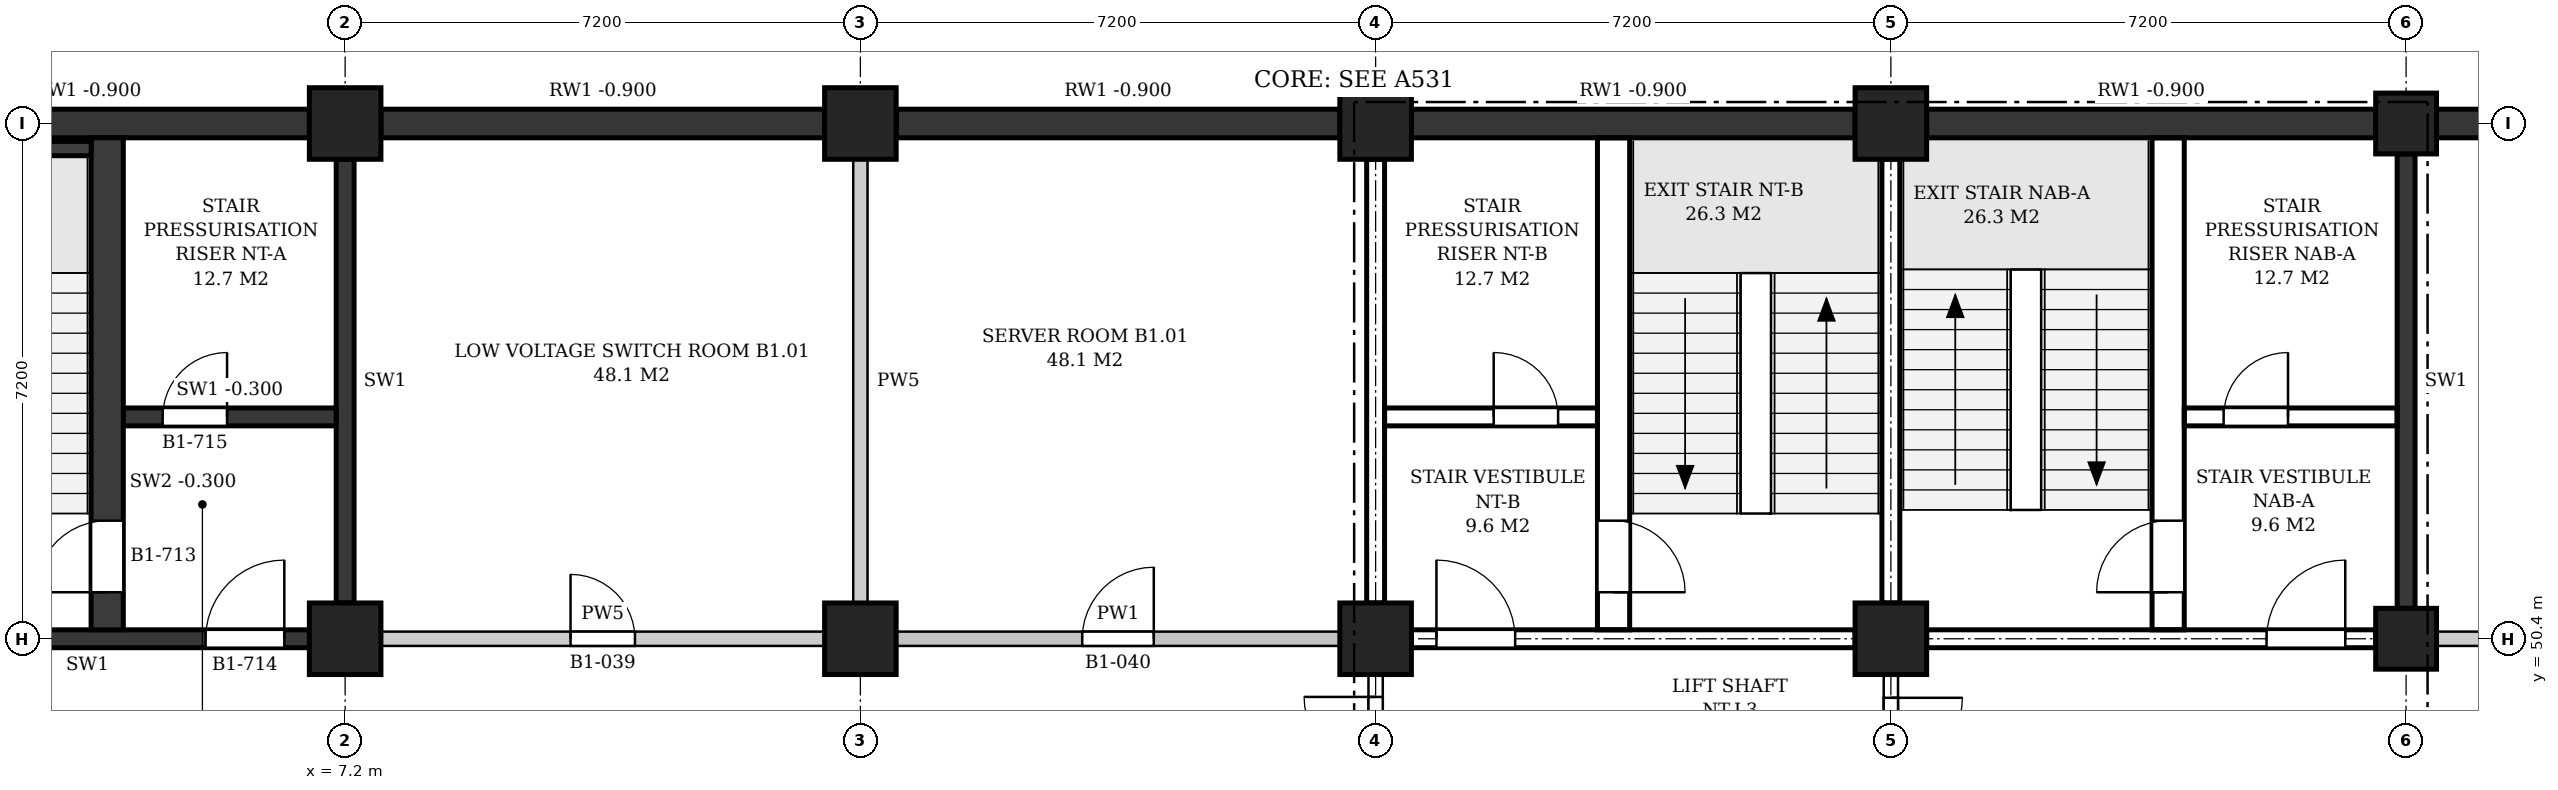
"""IFC4 building model, lengths in metres.
Left out: names, types, materials, properties, quantities, classifications, styles, units other than length and angle.
Written with IfcOpenShell. Run it as: python <this file> out.ifc"""

import sys

from ifc_helpers import new_model, si_unit, direction, frame, frame_2d, origin, origin_2d, place, context, subcontext, project, spatial, rectangle, extrude, element, fill, save


model = new_model("IFC4")
c1 = context("Model", 3, precision=1e-05, world=origin(), true_north=direction((0.0, 1.0)))
c2 = subcontext(c1, "Body", "Model", "MODEL_VIEW")
j1 = project(units=[si_unit("LENGTHUNIT", "METRE"), si_unit("PLANEANGLEUNIT", "RADIAN")], contexts=[c1])
p1 = place(None, origin())
s1 = spatial("IfcSite", under=j1, at=p1, CompositionType="ELEMENT")
p2 = place(p1, origin())
s2 = spatial("IfcBuilding", under=s1, at=p2, CompositionType="ELEMENT")
p3 = place(p2, frame((0.0, 0.0, -4.5)))
s3 = spatial("IfcBuildingStorey", under=s2, at=p3, CompositionType="ELEMENT", Elevation=-4.5)
for number, where, z_axis, x_axis in (
    (1, (7.2, 50.4, 0.0), (0.0, 0.0, 1.0), (1.0, 0.0, 0.0)),
    (2, (7.2, 57.6, 0.0), (0.0, 0.0, 1.0), (1.0, 0.0, 0.0)),
    (3, (14.4, 50.4, 0.0), (0.0, 0.0, 1.0), (1.0, 0.0, 0.0)),
    (4, (14.4, 57.6, 0.0), (0.0, 0.0, 1.0), (1.0, 0.0, 0.0)),
    (5, (21.6, 50.4, 0.0), (0.0, 0.0, 1.0), (1.0, 0.0, 0.0)),
    (6, (21.6, 57.6, 0.0), (0.0, 0.0, 1.0), (1.0, 0.0, 0.0)),
    (7, (28.8, 50.4, 0.0), (0.0, 0.0, 1.0), (1.0, 0.0, 0.0)),
    (8, (28.8, 57.6, 0.0), (0.0, 0.0, 1.0), (1.0, 0.0, 0.0)),
):
    element("IfcColumn", number, at=place(p3, frame(where, z_axis=z_axis, x_axis=x_axis)), inside=s3, PredefinedType="COLUMN", context=c2, shape_type="SweptSolid", body=[
        extrude(rectangle(XDim=1.0, YDim=1.0, at=origin_2d()), origin(), (0.0, 0.0, 1.0), 4.5),
    ])
for number, where, z_axis, x_axis in (
    (9, (36.0, 50.4, 0.0), (0.0, 0.0, 1.0), (1.0, 0.0, 0.0)),
    (10, (36.0, 57.6, 0.0), (0.0, 0.0, 1.0), (1.0, 0.0, 0.0)),
):
    element("IfcColumn", number, at=place(p3, frame(where, z_axis=z_axis, x_axis=x_axis)), inside=s3, PredefinedType="COLUMN", context=c2, shape_type="SweptSolid", body=[
        extrude(rectangle(XDim=0.85, YDim=0.85, at=origin_2d()), origin(), (0.0, 0.0, 1.0), 4.5),
    ])
p4 = place(p3, frame((42.775, 57.6, 0.0), z_axis=(0.0, 0.0, 1.0), x_axis=(-1.0, 0.0, 0.0)))
e11 = element("IfcWall", 11, at=p4, inside=s3, PredefinedType="SOLIDWALL", context=c2, shape_type="SweptSolid", body=[
    extrude(rectangle(XDim=6.35, YDim=0.4, at=frame_2d((3.175, 0.0))), origin(), (0.0, 0.0, 1.0), 3.6),
])
p5 = place(p3, frame((35.575, 57.6, 0.0), z_axis=(0.0, 0.0, 1.0), x_axis=(-1.0, 0.0, 0.0)))
e12 = element("IfcWall", 12, at=p5, inside=s3, PredefinedType="SOLIDWALL", context=c2, shape_type="SweptSolid", body=[
    extrude(rectangle(XDim=6.275, YDim=0.4, at=frame_2d((3.137, 0.0))), origin(), (0.0, 0.0, 1.0), 3.6),
])
p6 = place(p3, frame((28.3, 57.6, 0.0), z_axis=(0.0, 0.0, 1.0), x_axis=(-1.0, 0.0, 0.0)))
e13 = element("IfcWall", 13, at=p6, inside=s3, PredefinedType="SOLIDWALL", context=c2, shape_type="SweptSolid", body=[
    extrude(rectangle(XDim=6.2, YDim=0.4, at=frame_2d((3.1, 0.0))), origin(), (0.0, 0.0, 1.0), 3.6),
])
p7 = place(p3, frame((21.1, 57.6, 0.0), z_axis=(0.0, 0.0, 1.0), x_axis=(-1.0, 0.0, 0.0)))
e14 = element("IfcWall", 14, at=p7, inside=s3, PredefinedType="SOLIDWALL", context=c2, shape_type="SweptSolid", body=[
    extrude(rectangle(XDim=6.2, YDim=0.4, at=frame_2d((3.1, 0.0))), origin(), (0.0, 0.0, 1.0), 3.6),
])
for number, where, z_axis, x_axis in (
    (15, (13.9, 57.6, 0.0), (0.0, 0.0, 1.0), (-1.0, 0.0, 0.0)),
    (16, (6.7, 57.6, 0.0), (0.0, 0.0, 1.0), (-1.0, 0.0, 0.0)),
):
    element("IfcWall", number, at=place(p3, frame(where, z_axis=z_axis, x_axis=x_axis)), inside=s3, PredefinedType="SOLIDWALL", context=c2, shape_type="SweptSolid", body=[
        extrude(rectangle(XDim=6.2, YDim=0.4, at=frame_2d((3.1, 0.0))), origin(), (0.0, 0.0, 1.0), 3.6),
    ])
p8 = place(p3, frame((29.3, 50.4, 0.0), z_axis=(0.0, 0.0, 1.0), x_axis=(1.0, 0.0, 0.0)))
e17 = element("IfcWall", 17, at=p8, inside=s3, PredefinedType="SHEAR", context=c2, shape_type="SweptSolid", body=[
    extrude(rectangle(XDim=6.275, YDim=0.25, at=frame_2d((3.137, 0.0))), origin(), (0.0, 0.0, 1.0), 3.4),
])
p9 = place(p8, frame((4.75, 0.0, 0.0)))
e18 = element("IfcOpeningElement", 18, at=p9, cuts=e17, PredefinedType="OPENING", context=c2, shape_type="SweptSolid", body=[
    extrude(rectangle(XDim=1.1, YDim=2.1, at=frame_2d((0.55, 1.05))), frame((0.0, 0.135, 0.0), z_axis=(0.0, -1.0, 0.0), x_axis=(1.0, 0.0, 0.0)), (0.0, 0.0, 1.0), 0.27),
])
p10 = place(p3, frame((28.8, 50.9, 0.0), z_axis=(0.0, 0.0, 1.0), x_axis=(0.0, 1.0, 0.0)))
e19 = element("IfcWall", 19, at=p10, inside=s3, PredefinedType="SHEAR", context=c2, shape_type="SweptSolid", body=[
    extrude(rectangle(XDim=6.2, YDim=0.25, at=frame_2d((3.1, 0.0))), origin(), (0.0, 0.0, 1.0), 3.4),
])
p11 = place(p3, frame((36.0, 50.825, 0.0), z_axis=(0.0, 0.0, 1.0), x_axis=(0.0, 1.0, 0.0)))
e20 = element("IfcWall", 20, at=p11, inside=s3, PredefinedType="SHEAR", context=c2, shape_type="SweptSolid", body=[
    extrude(rectangle(XDim=6.35, YDim=0.25, at=frame_2d((3.175, 0.0))), origin(), (0.0, 0.0, 1.0), 3.4),
])
p12 = place(p3, frame((32.675, 50.525, 0.0), z_axis=(0.0, 0.0, 1.0), x_axis=(0.0, 1.0, 0.0)))
e21 = element("IfcWall", 21, at=p12, inside=s3, PredefinedType="SHEAR", context=c2, shape_type="SweptSolid", body=[
    extrude(rectangle(XDim=6.875, YDim=0.45, at=frame_2d((3.438, 0.0))), origin(), (0.0, 0.0, 1.0), 4.2),
])
p13 = place(p12, frame((0.525, 0.0, 0.0)))
e22 = element("IfcOpeningElement", 22, at=p13, cuts=e21, PredefinedType="OPENING", context=c2, shape_type="SweptSolid", body=[
    extrude(rectangle(XDim=1.0, YDim=2.1, at=frame_2d((0.5, 1.05))), frame((0.0, 0.235, 0.0), z_axis=(0.0, -1.0, 0.0), x_axis=(1.0, 0.0, 0.0)), (0.0, 0.0, 1.0), 0.47),
])
p14 = place(p3, frame((32.9, 53.5, 0.0), z_axis=(0.0, 0.0, 1.0), x_axis=(1.0, 0.0, 0.0)))
e23 = element("IfcWall", 23, at=p14, inside=s3, PredefinedType="SHEAR", context=c2, shape_type="SweptSolid", body=[
    extrude(rectangle(XDim=2.975, YDim=0.25, at=frame_2d((1.488, 0.0))), origin(), (0.0, 0.0, 1.0), 4.2),
])
p15 = place(p14, frame((0.55, 0.0, 0.0)))
e24 = element("IfcOpeningElement", 24, at=p15, cuts=e23, PredefinedType="OPENING", context=c2, shape_type="SweptSolid", body=[
    extrude(rectangle(XDim=0.9, YDim=2.1, at=frame_2d((0.45, 1.05))), frame((0.0, 0.135, 0.0), z_axis=(0.0, -1.0, 0.0), x_axis=(1.0, 0.0, 0.0)), (0.0, 0.0, 1.0), 0.27),
])
p16 = place(p3, frame((0.5, 50.4, 0.0), z_axis=(0.0, 0.0, 1.0), x_axis=(1.0, 0.0, 0.0)))
e25 = element("IfcWall", 25, at=p16, inside=s3, PredefinedType="SHEAR", context=c2, shape_type="SweptSolid", body=[
    extrude(rectangle(XDim=6.2, YDim=0.25, at=frame_2d((3.1, 0.0))), origin(), (0.0, 0.0, 1.0), 3.4),
])
p17 = place(p16, frame((4.75, 0.0, 0.0)))
e26 = element("IfcOpeningElement", 26, at=p17, cuts=e25, PredefinedType="OPENING", context=c2, shape_type="SweptSolid", body=[
    extrude(rectangle(XDim=1.1, YDim=2.1, at=frame_2d((0.55, 1.05))), frame((0.0, 0.135, 0.0), z_axis=(0.0, -1.0, 0.0), x_axis=(1.0, 0.0, 0.0)), (0.0, 0.0, 1.0), 0.27),
])
p18 = place(p3, frame((7.2, 50.9, 0.0), z_axis=(0.0, 0.0, 1.0), x_axis=(0.0, 1.0, 0.0)))
e27 = element("IfcWall", 27, at=p18, inside=s3, PredefinedType="SHEAR", context=c2, shape_type="SweptSolid", body=[
    extrude(rectangle(XDim=6.2, YDim=0.25, at=frame_2d((3.1, 0.0))), origin(), (0.0, 0.0, 1.0), 3.4),
])
p19 = place(p3, frame((0.5, 57.25, 0.0), z_axis=(0.0, 0.0, 1.0), x_axis=(1.0, 0.0, 0.0)))
e28 = element("IfcWall", 28, at=p19, inside=s3, PredefinedType="SHEAR", context=c2, shape_type="SweptSolid", body=[
    extrude(rectangle(XDim=3.15, YDim=0.2, at=frame_2d((1.575, 0.0))), origin(), (0.0, 0.0, 1.0), 4.2),
])
p20 = place(p3, frame((3.875, 50.525, 0.0), z_axis=(0.0, 0.0, 1.0), x_axis=(0.0, 1.0, 0.0)))
e29 = element("IfcWall", 29, at=p20, inside=s3, PredefinedType="SHEAR", context=c2, shape_type="SweptSolid", body=[
    extrude(rectangle(XDim=6.875, YDim=0.45, at=frame_2d((3.438, 0.0))), origin(), (0.0, 0.0, 1.0), 4.2),
])
p21 = place(p20, frame((0.525, 0.0, 0.0)))
e30 = element("IfcOpeningElement", 30, at=p21, cuts=e29, PredefinedType="OPENING", context=c2, shape_type="SweptSolid", body=[
    extrude(rectangle(XDim=1.0, YDim=2.1, at=frame_2d((0.5, 1.05))), frame((0.0, 0.235, 0.0), z_axis=(0.0, -1.0, 0.0), x_axis=(1.0, 0.0, 0.0)), (0.0, 0.0, 1.0), 0.47),
])
p22 = place(p3, frame((4.1, 53.5, 0.0), z_axis=(0.0, 0.0, 1.0), x_axis=(1.0, 0.0, 0.0)))
e31 = element("IfcWall", 31, at=p22, inside=s3, PredefinedType="SHEAR", context=c2, shape_type="SweptSolid", body=[
    extrude(rectangle(XDim=2.975, YDim=0.25, at=frame_2d((1.487, 0.0))), origin(), (0.0, 0.0, 1.0), 4.2),
])
p23 = place(p22, frame((0.55, 0.0, 0.0)))
e32 = element("IfcOpeningElement", 32, at=p23, cuts=e31, PredefinedType="OPENING", context=c2, shape_type="SweptSolid", body=[
    extrude(rectangle(XDim=0.9, YDim=2.1, at=frame_2d((0.45, 1.05))), frame((0.0, 0.135, 0.0), z_axis=(0.0, -1.0, 0.0), x_axis=(1.0, 0.0, 0.0)), (0.0, 0.0, 1.0), 0.27),
])
p24 = place(p3, frame((22.1, 50.4, 0.0), z_axis=(0.0, 0.0, 1.0), x_axis=(1.0, 0.0, 0.0)))
e33 = element("IfcWall", 33, at=p24, inside=s3, PredefinedType="SHEAR", context=c2, shape_type="SweptSolid", body=[
    extrude(rectangle(XDim=6.2, YDim=0.25, at=frame_2d((3.1, 0.0))), origin(), (0.0, 0.0, 1.0), 3.4),
])
p25 = place(p24, frame((0.35, 0.0, 0.0)))
e34 = element("IfcOpeningElement", 34, at=p25, cuts=e33, PredefinedType="OPENING", context=c2, shape_type="SweptSolid", body=[
    extrude(rectangle(XDim=1.1, YDim=2.1, at=frame_2d((0.55, 1.05))), frame((0.0, 0.135, 0.0), z_axis=(0.0, -1.0, 0.0), x_axis=(1.0, 0.0, 0.0)), (0.0, 0.0, 1.0), 0.27),
])
p26 = place(p3, frame((21.6, 50.9, 0.0), z_axis=(0.0, 0.0, 1.0), x_axis=(0.0, 1.0, 0.0)))
e35 = element("IfcWall", 35, at=p26, inside=s3, PredefinedType="SHEAR", context=c2, shape_type="SweptSolid", body=[
    extrude(rectangle(XDim=6.2, YDim=0.25, at=frame_2d((3.1, 0.0))), origin(), (0.0, 0.0, 1.0), 3.4),
])
p27 = place(p3, frame((24.925, 50.525, 0.0), z_axis=(0.0, 0.0, 1.0), x_axis=(0.0, 1.0, 0.0)))
e36 = element("IfcWall", 36, at=p27, inside=s3, PredefinedType="SHEAR", context=c2, shape_type="SweptSolid", body=[
    extrude(rectangle(XDim=6.875, YDim=0.45, at=frame_2d((3.438, 0.0))), origin(), (0.0, 0.0, 1.0), 4.2),
])
p28 = place(p27, frame((0.525, 0.0, 0.0)))
e37 = element("IfcOpeningElement", 37, at=p28, cuts=e36, PredefinedType="OPENING", context=c2, shape_type="SweptSolid", body=[
    extrude(rectangle(XDim=1.0, YDim=2.1, at=frame_2d((0.5, 1.05))), frame((0.0, 0.235, 0.0), z_axis=(0.0, -1.0, 0.0), x_axis=(1.0, 0.0, 0.0)), (0.0, 0.0, 1.0), 0.47),
])
p29 = place(p3, frame((21.725, 53.5, 0.0), z_axis=(0.0, 0.0, 1.0), x_axis=(1.0, 0.0, 0.0)))
e38 = element("IfcWall", 38, at=p29, inside=s3, PredefinedType="SHEAR", context=c2, shape_type="SweptSolid", body=[
    extrude(rectangle(XDim=2.975, YDim=0.25, at=frame_2d((1.487, 0.0))), origin(), (0.0, 0.0, 1.0), 4.2),
])
p30 = place(p29, frame((1.525, 0.0, 0.0)))
e39 = element("IfcOpeningElement", 39, at=p30, cuts=e38, PredefinedType="OPENING", context=c2, shape_type="SweptSolid", body=[
    extrude(rectangle(XDim=0.9, YDim=2.1, at=frame_2d((0.45, 1.05))), frame((0.0, 0.135, 0.0), z_axis=(0.0, -1.0, 0.0), x_axis=(1.0, 0.0, 0.0)), (0.0, 0.0, 1.0), 0.27),
])
p31 = place(p3, frame((7.7, 50.4, 0.0), z_axis=(0.0, 0.0, 1.0), x_axis=(1.0, 0.0, 0.0)))
e40 = element("IfcWall", 40, at=p31, inside=s3, PredefinedType="SOLIDWALL", context=c2, shape_type="SweptSolid", body=[
    extrude(rectangle(XDim=6.2, YDim=0.2, at=frame_2d((3.1, 0.0))), origin(), (0.0, 0.0, 1.0), 3.4),
])
p32 = place(p31, frame((2.65, 0.0, 0.0)))
e41 = element("IfcOpeningElement", 41, at=p32, cuts=e40, PredefinedType="OPENING", context=c2, shape_type="SweptSolid", body=[
    extrude(rectangle(XDim=0.9, YDim=2.1, at=frame_2d((0.45, 1.05))), frame((0.0, 0.11, 0.0), z_axis=(0.0, -1.0, 0.0), x_axis=(1.0, 0.0, 0.0)), (0.0, 0.0, 1.0), 0.22),
])
p33 = place(p3, frame((14.9, 50.4, 0.0), z_axis=(0.0, 0.0, 1.0), x_axis=(1.0, 0.0, 0.0)))
e42 = element("IfcWall", 42, at=p33, inside=s3, PredefinedType="PARTITIONING", context=c2, shape_type="SweptSolid", body=[
    extrude(rectangle(XDim=6.2, YDim=0.2, at=frame_2d((3.1, 0.0))), origin(), (0.0, 0.0, 1.0), 3.4),
])
p34 = place(p33, frame((2.6, 0.0, 0.0)))
e43 = element("IfcOpeningElement", 43, at=p34, cuts=e42, PredefinedType="OPENING", context=c2, shape_type="SweptSolid", body=[
    extrude(rectangle(XDim=1.0, YDim=2.1, at=frame_2d((0.5, 1.05))), frame((0.0, 0.11, 0.0), z_axis=(0.0, -1.0, 0.0), x_axis=(1.0, 0.0, 0.0)), (0.0, 0.0, 1.0), 0.22),
])
p35 = place(p3, frame((36.425, 50.4, 0.0), z_axis=(0.0, 0.0, 1.0), x_axis=(1.0, 0.0, 0.0)))
e44 = element("IfcWall", 44, at=p35, inside=s3, PredefinedType="SOLIDWALL", context=c2, shape_type="SweptSolid", body=[
    extrude(rectangle(XDim=6.35, YDim=0.2, at=frame_2d((3.175, 0.0))), origin(), (0.0, 0.0, 1.0), 3.4),
])
p36 = place(p3, frame((14.4, 50.9, 0.0), z_axis=(0.0, 0.0, 1.0), x_axis=(0.0, 1.0, 0.0)))
e45 = element("IfcWall", 45, at=p36, inside=s3, PredefinedType="SOLIDWALL", context=c2, shape_type="SweptSolid", body=[
    extrude(rectangle(XDim=6.2, YDim=0.2, at=frame_2d((3.1, 0.0))), origin(), (0.0, 0.0, 1.0), 3.4),
])
p37 = place(p3, frame((21.6, 47.275, 0.0), z_axis=(0.0, 0.0, 1.0), x_axis=(0.0, 1.0, 0.0)))
e46 = element("IfcWall", 46, at=p37, inside=s3, PredefinedType="PARTITIONING", context=c2, shape_type="SweptSolid", body=[
    extrude(rectangle(XDim=2.625, YDim=0.2, at=frame_2d((1.312, 0.0))), origin(), (0.0, 0.0, 1.0), 3.4),
])
p38 = place(p37, frame((0.312, 0.0, 0.0)))
e47 = element("IfcOpeningElement", 47, at=p38, cuts=e46, PredefinedType="OPENING", context=c2, shape_type="SweptSolid", body=[
    extrude(rectangle(XDim=2.0, YDim=2.4, at=frame_2d((1.0, 1.2))), frame((0.0, 0.11, 0.0), z_axis=(0.0, -1.0, 0.0), x_axis=(1.0, 0.0, 0.0)), (0.0, 0.0, 1.0), 0.22),
])
p39 = place(p3, frame((28.8, 47.25, 0.0), z_axis=(0.0, 0.0, 1.0), x_axis=(0.0, 1.0, 0.0)))
e48 = element("IfcWall", 48, at=p39, inside=s3, PredefinedType="PARTITIONING", context=c2, shape_type="SweptSolid", body=[
    extrude(rectangle(XDim=2.65, YDim=0.2, at=frame_2d((1.325, 0.0))), origin(), (0.0, 0.0, 1.0), 3.4),
])
p40 = place(p39, frame((0.325, 0.0, 0.0)))
e49 = element("IfcOpeningElement", 49, at=p40, cuts=e48, PredefinedType="OPENING", context=c2, shape_type="SweptSolid", body=[
    extrude(rectangle(XDim=2.0, YDim=2.4, at=frame_2d((1.0, 1.2))), frame((0.0, 0.11, 0.0), z_axis=(0.0, -1.0, 0.0), x_axis=(1.0, 0.0, 0.0)), (0.0, 0.0, 1.0), 0.22),
])
p41 = place(p13, origin())
e50 = element("IfcDoor", 50, at=p41, inside=s3, OperationType="SINGLE_SWING_LEFT", PredefinedType="DOOR", context=c2, shape_type="SweptSolid", body=[
    extrude(rectangle(XDim=1.0, YDim=2.1, at=frame_2d((0.5, 1.05))), frame((0.0, 0.025, 0.0), z_axis=(0.0, -1.0, 0.0), x_axis=(1.0, 0.0, 0.0)), (0.0, 0.0, 1.0), 0.05),
])
fill(e22, e50)
p42 = place(p9, origin())
e51 = element("IfcDoor", 51, at=p42, inside=s3, OperationType="SINGLE_SWING_RIGHT", PredefinedType="DOOR", context=c2, shape_type="SweptSolid", body=[
    extrude(rectangle(XDim=1.1, YDim=2.1, at=frame_2d((0.55, 1.05))), frame((0.0, 0.025, 0.0), z_axis=(0.0, -1.0, 0.0), x_axis=(1.0, 0.0, 0.0)), (0.0, 0.0, 1.0), 0.05),
])
fill(e18, e51)
p43 = place(p15, origin())
e52 = element("IfcDoor", 52, at=p43, inside=s3, OperationType="SINGLE_SWING_RIGHT", PredefinedType="DOOR", context=c2, shape_type="SweptSolid", body=[
    extrude(rectangle(XDim=0.9, YDim=2.1, at=frame_2d((0.45, 1.05))), frame((0.0, 0.025, 0.0), z_axis=(0.0, -1.0, 0.0), x_axis=(1.0, 0.0, 0.0)), (0.0, 0.0, 1.0), 0.05),
])
fill(e24, e52)
p44 = place(p21, origin())
e53 = element("IfcDoor", 53, at=p44, inside=s3, OperationType="SINGLE_SWING_LEFT", PredefinedType="DOOR", context=c2, shape_type="SweptSolid", body=[
    extrude(rectangle(XDim=1.0, YDim=2.1, at=frame_2d((0.5, 1.05))), frame((0.0, 0.025, 0.0), z_axis=(0.0, -1.0, 0.0), x_axis=(1.0, 0.0, 0.0)), (0.0, 0.0, 1.0), 0.05),
])
fill(e30, e53)
p45 = place(p17, origin())
e54 = element("IfcDoor", 54, at=p45, inside=s3, OperationType="SINGLE_SWING_RIGHT", PredefinedType="DOOR", context=c2, shape_type="SweptSolid", body=[
    extrude(rectangle(XDim=1.1, YDim=2.1, at=frame_2d((0.55, 1.05))), frame((0.0, 0.025, 0.0), z_axis=(0.0, -1.0, 0.0), x_axis=(1.0, 0.0, 0.0)), (0.0, 0.0, 1.0), 0.05),
])
fill(e26, e54)
p46 = place(p23, origin())
e55 = element("IfcDoor", 55, at=p46, inside=s3, OperationType="SINGLE_SWING_RIGHT", PredefinedType="DOOR", context=c2, shape_type="SweptSolid", body=[
    extrude(rectangle(XDim=0.9, YDim=2.1, at=frame_2d((0.45, 1.05))), frame((0.0, 0.025, 0.0), z_axis=(0.0, -1.0, 0.0), x_axis=(1.0, 0.0, 0.0)), (0.0, 0.0, 1.0), 0.05),
])
fill(e32, e55)
p47 = place(p28, frame((1.0, 0.0, 0.0), z_axis=(0.0, 0.0, 1.0), x_axis=(-1.0, 0.0, 0.0)))
e56 = element("IfcDoor", 56, at=p47, inside=s3, OperationType="SINGLE_SWING_RIGHT", PredefinedType="DOOR", context=c2, shape_type="SweptSolid", body=[
    extrude(rectangle(XDim=1.0, YDim=2.1, at=frame_2d((0.5, 1.05))), frame((0.0, 0.025, 0.0), z_axis=(0.0, -1.0, 0.0), x_axis=(1.0, 0.0, 0.0)), (0.0, 0.0, 1.0), 0.05),
])
fill(e37, e56)
p48 = place(p25, origin())
e57 = element("IfcDoor", 57, at=p48, inside=s3, OperationType="SINGLE_SWING_LEFT", PredefinedType="DOOR", context=c2, shape_type="SweptSolid", body=[
    extrude(rectangle(XDim=1.1, YDim=2.1, at=frame_2d((0.55, 1.05))), frame((0.0, 0.025, 0.0), z_axis=(0.0, -1.0, 0.0), x_axis=(1.0, 0.0, 0.0)), (0.0, 0.0, 1.0), 0.05),
])
fill(e34, e57)
p49 = place(p30, origin())
e58 = element("IfcDoor", 58, at=p49, inside=s3, OperationType="SINGLE_SWING_LEFT", PredefinedType="DOOR", context=c2, shape_type="SweptSolid", body=[
    extrude(rectangle(XDim=0.9, YDim=2.1, at=frame_2d((0.45, 1.05))), frame((0.0, 0.025, 0.0), z_axis=(0.0, -1.0, 0.0), x_axis=(1.0, 0.0, 0.0)), (0.0, 0.0, 1.0), 0.05),
])
fill(e39, e58)
p50 = place(p38, origin())
e59 = element("IfcDoor", 59, at=p50, inside=s3, OperationType="DOUBLE_DOOR_SINGLE_SWING", PredefinedType="DOOR", context=c2, shape_type="SweptSolid", body=[
    extrude(rectangle(XDim=2.0, YDim=2.4, at=frame_2d((1.0, 1.2))), frame((0.0, 0.025, 0.0), z_axis=(0.0, -1.0, 0.0), x_axis=(1.0, 0.0, 0.0)), (0.0, 0.0, 1.0), 0.05),
])
fill(e47, e59)
p51 = place(p40, origin())
e60 = element("IfcDoor", 60, at=p51, inside=s3, OperationType="DOUBLE_DOOR_SINGLE_SWING", PredefinedType="DOOR", context=c2, shape_type="SweptSolid", body=[
    extrude(rectangle(XDim=2.0, YDim=2.4, at=frame_2d((1.0, 1.2))), frame((0.0, 0.025, 0.0), z_axis=(0.0, -1.0, 0.0), x_axis=(1.0, 0.0, 0.0)), (0.0, 0.0, 1.0), 0.05),
])
fill(e49, e60)
p52 = place(p32, origin())
e61 = element("IfcDoor", 61, at=p52, inside=s3, OperationType="SINGLE_SWING_LEFT", PredefinedType="DOOR", context=c2, shape_type="SweptSolid", body=[
    extrude(rectangle(XDim=0.9, YDim=2.1, at=frame_2d((0.45, 1.05))), frame((0.0, 0.025, 0.0), z_axis=(0.0, -1.0, 0.0), x_axis=(1.0, 0.0, 0.0)), (0.0, 0.0, 1.0), 0.05),
])
fill(e41, e61)
p53 = place(p34, origin())
e62 = element("IfcDoor", 62, at=p53, inside=s3, OperationType="SINGLE_SWING_RIGHT", PredefinedType="DOOR", context=c2, shape_type="SweptSolid", body=[
    extrude(rectangle(XDim=1.0, YDim=2.1, at=frame_2d((0.5, 1.05))), frame((0.0, 0.025, 0.0), z_axis=(0.0, -1.0, 0.0), x_axis=(1.0, 0.0, 0.0)), (0.0, 0.0, 1.0), 0.05),
])
fill(e43, e62)
save(model, sys.argv[1])
